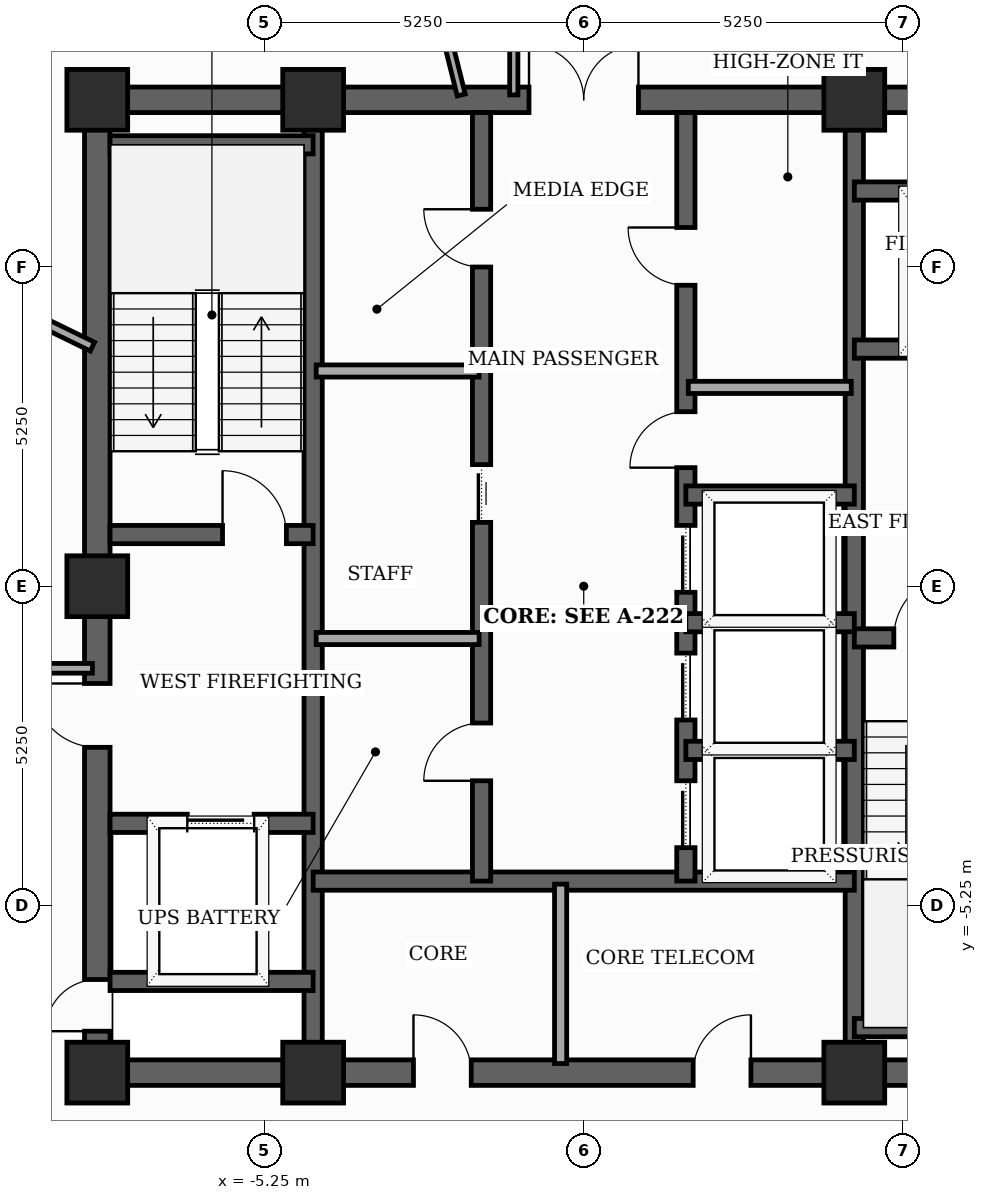
"""IFC4 building model, lengths in metres.
Left out: names, types, materials, properties, quantities, classifications, styles, units other than length and angle.
Written with IfcOpenShell. Run it as: python <this file> out.ifc"""

import sys

from ifc_helpers import new_model, si_unit, direction, frame, frame_2d, origin, origin_2d, place, context, subcontext, project, spatial, rectangle, extrude, element, fill, save


model = new_model("IFC4")
c1 = context("Model", 3, precision=1e-05, world=origin(), true_north=direction((0.0, 1.0)))
c2 = subcontext(c1, "Body", "Model", "MODEL_VIEW")
j1 = project(units=[si_unit("LENGTHUNIT", "METRE"), si_unit("PLANEANGLEUNIT", "RADIAN")], contexts=[c1])
p1 = place(None, origin())
s1 = spatial("IfcSite", under=j1, at=p1, CompositionType="ELEMENT")
p2 = place(p1, origin())
s2 = spatial("IfcBuilding", under=s1, at=p2, CompositionType="ELEMENT")
p3 = place(p2, frame((0.0, 0.0, 255.9)))
s3 = spatial("IfcBuildingStorey", under=s2, at=p3, CompositionType="ELEMENT", Elevation=255.9)
for number, where, z_axis, x_axis in (
    (1, (-8.0, -8.0, 0.0), (0.0, 0.0, 1.0), (1.0, 0.0, 0.0)),
    (2, (-4.45, -8.0, 0.0), (0.0, 0.0, 1.0), (1.0, 0.0, 0.0)),
    (3, (4.45, -8.0, 0.0), (0.0, 0.0, 1.0), (1.0, 0.0, 0.0)),
    (4, (4.45, 8.0, 0.0), (0.0, 0.0, 1.0), (1.0, 0.0, 0.0)),
    (5, (-4.45, 8.0, 0.0), (0.0, 0.0, 1.0), (1.0, 0.0, 0.0)),
    (6, (-8.0, 8.0, 0.0), (0.0, 0.0, 1.0), (1.0, 0.0, 0.0)),
    (7, (-8.0, 0.0, 0.0), (0.0, 0.0, 1.0), (1.0, 0.0, 0.0)),
):
    element("IfcColumn", number, at=place(p3, frame(where, z_axis=z_axis, x_axis=x_axis)), inside=s3, PredefinedType="COLUMN", context=c2, shape_type="SweptSolid", body=[
        extrude(rectangle(XDim=1.0, YDim=1.0, at=origin_2d()), origin(), (0.0, 0.0, 1.0), 3.7),
    ])
p4 = place(p3, frame((-8.0, -8.0, 0.0), z_axis=(0.0, 0.0, 1.0), x_axis=(0.0, 1.0, 0.0)))
e8 = element("IfcWall", 8, at=p4, inside=s3, PredefinedType="SHEAR", context=c2, shape_type="SweptSolid", body=[
    extrude(rectangle(XDim=16.0, YDim=0.42, at=frame_2d((8.0, 0.0))), origin(), (0.0, 0.0, 1.0), 3.5),
])
p5 = place(p4, frame((0.681, 0.0, 0.0)))
e9 = element("IfcOpeningElement", 9, at=p5, cuts=e8, PredefinedType="OPENING", context=c2, shape_type="SweptSolid", body=[
    extrude(rectangle(XDim=0.85, YDim=2.02, at=frame_2d((0.425, 1.01))), frame((0.0, 0.22, 0.0), z_axis=(0.0, -1.0, 0.0), x_axis=(1.0, 0.0, 0.0)), (0.0, 0.0, 1.0), 0.44),
])
p6 = place(p4, frame((5.35, 0.0, 0.0)))
e10 = element("IfcOpeningElement", 10, at=p6, cuts=e8, PredefinedType="OPENING", context=c2, shape_type="SweptSolid", body=[
    extrude(rectangle(XDim=1.05, YDim=2.15, at=frame_2d((0.525, 1.075))), frame((0.0, 0.22, 0.0), z_axis=(0.0, -1.0, 0.0), x_axis=(1.0, 0.0, 0.0)), (0.0, 0.0, 1.0), 0.44),
])
p7 = place(p3, frame((-8.0, -8.0, 0.0), z_axis=(0.0, 0.0, 1.0), x_axis=(1.0, 0.0, 0.0)))
e11 = element("IfcWall", 11, at=p7, inside=s3, PredefinedType="SHEAR", context=c2, shape_type="SweptSolid", body=[
    extrude(rectangle(XDim=16.0, YDim=0.42, at=frame_2d((8.0, 0.0))), origin(), (0.0, 0.0, 1.0), 3.5),
])
p8 = place(p7, frame((5.2, 0.0, 0.0)))
e12 = element("IfcOpeningElement", 12, at=p8, cuts=e11, PredefinedType="OPENING", context=c2, shape_type="SweptSolid", body=[
    extrude(rectangle(XDim=0.95, YDim=2.1, at=frame_2d((0.475, 1.05))), frame((0.0, 0.22, 0.0), z_axis=(0.0, -1.0, 0.0), x_axis=(1.0, 0.0, 0.0)), (0.0, 0.0, 1.0), 0.44),
])
p9 = place(p7, frame((9.8, 0.0, 0.0)))
e13 = element("IfcOpeningElement", 13, at=p9, cuts=e11, PredefinedType="OPENING", context=c2, shape_type="SweptSolid", body=[
    extrude(rectangle(XDim=0.95, YDim=2.1, at=frame_2d((0.475, 1.05))), frame((0.0, 0.22, 0.0), z_axis=(0.0, -1.0, 0.0), x_axis=(1.0, 0.0, 0.0)), (0.0, 0.0, 1.0), 0.44),
])
p10 = place(p3, frame((-8.0, 8.0, 0.0), z_axis=(0.0, 0.0, 1.0), x_axis=(1.0, 0.0, 0.0)))
e14 = element("IfcWall", 14, at=p10, inside=s3, PredefinedType="SHEAR", context=c2, shape_type="SweptSolid", body=[
    extrude(rectangle(XDim=16.0, YDim=0.42, at=frame_2d((8.0, 0.0))), origin(), (0.0, 0.0, 1.0), 3.5),
])
p11 = place(p10, frame((7.1, 0.0, 0.0)))
e15 = element("IfcOpeningElement", 15, at=p11, cuts=e14, PredefinedType="OPENING", context=c2, shape_type="SweptSolid", body=[
    extrude(rectangle(XDim=1.8, YDim=2.15, at=frame_2d((0.9, 1.075))), frame((0.0, 0.22, 0.0), z_axis=(0.0, -1.0, 0.0), x_axis=(1.0, 0.0, 0.0)), (0.0, 0.0, 1.0), 0.44),
])
for number, where, z_axis, x_axis in (
    (16, (-4.45, -7.79, 0.0), (0.0, 0.0, 1.0), (0.0, 1.0, 0.0)),
    (17, (4.45, -7.79, 0.0), (0.0, 0.0, 1.0), (0.0, 1.0, 0.0)),
):
    element("IfcWall", number, at=place(p3, frame(where, z_axis=z_axis, x_axis=x_axis)), inside=s3, PredefinedType="SHEAR", context=c2, shape_type="SweptSolid", body=[
        extrude(rectangle(XDim=15.58, YDim=0.3, at=frame_2d((7.79, 0.0))), origin(), (0.0, 0.0, 1.0), 3.5),
    ])
p12 = place(p3, frame((-7.79, 0.85, 0.0), z_axis=(0.0, 0.0, 1.0), x_axis=(1.0, 0.0, 0.0)))
e18 = element("IfcWall", 18, at=p12, inside=s3, PredefinedType="SHEAR", context=c2, shape_type="SweptSolid", body=[
    extrude(rectangle(XDim=3.34, YDim=0.3, at=frame_2d((1.67, 0.0))), origin(), (0.0, 0.0, 1.0), 3.5),
])
p13 = place(p12, frame((1.85, 0.0, 0.0)))
e19 = element("IfcOpeningElement", 19, at=p13, cuts=e18, PredefinedType="OPENING", context=c2, shape_type="SweptSolid", body=[
    extrude(rectangle(XDim=1.05, YDim=2.15, at=frame_2d((0.525, 1.075))), frame((0.0, 0.16, 0.0), z_axis=(0.0, -1.0, 0.0), x_axis=(1.0, 0.0, 0.0)), (0.0, 0.0, 1.0), 0.32),
])
p14 = place(p3, frame((-7.79, 7.26, 0.0), z_axis=(0.0, 0.0, 1.0), x_axis=(1.0, 0.0, 0.0)))
e20 = element("IfcWall", 20, at=p14, inside=s3, PredefinedType="SHEAR", context=c2, shape_type="SweptSolid", body=[
    extrude(rectangle(XDim=3.34, YDim=0.3, at=frame_2d((1.67, 0.0))), origin(), (0.0, 0.0, 1.0), 3.5),
])
p15 = place(p3, frame((4.45, -0.85, 0.0), z_axis=(0.0, 0.0, 1.0), x_axis=(1.0, 0.0, 0.0)))
e21 = element("IfcWall", 21, at=p15, inside=s3, PredefinedType="SHEAR", context=c2, shape_type="SweptSolid", body=[
    extrude(rectangle(XDim=3.34, YDim=0.3, at=frame_2d((1.67, 0.0))), origin(), (0.0, 0.0, 1.0), 3.5),
])
p16 = place(p15, frame((0.65, 0.0, 0.0)))
e22 = element("IfcOpeningElement", 22, at=p16, cuts=e21, PredefinedType="OPENING", context=c2, shape_type="SweptSolid", body=[
    extrude(rectangle(XDim=1.05, YDim=2.15, at=frame_2d((0.525, 1.075))), frame((0.0, 0.16, 0.0), z_axis=(0.0, -1.0, 0.0), x_axis=(1.0, 0.0, 0.0)), (0.0, 0.0, 1.0), 0.32),
])
p17 = place(p3, frame((4.45, -7.26, 0.0), z_axis=(0.0, 0.0, 1.0), x_axis=(1.0, 0.0, 0.0)))
e23 = element("IfcWall", 23, at=p17, inside=s3, PredefinedType="SHEAR", context=c2, shape_type="SweptSolid", body=[
    extrude(rectangle(XDim=3.55, YDim=0.3, at=frame_2d((1.775, 0.0))), origin(), (0.0, 0.0, 1.0), 3.5),
])
p18 = place(p3, frame((-7.79, -3.9, 0.0), z_axis=(0.0, 0.0, 1.0), x_axis=(1.0, 0.0, 0.0)))
e24 = element("IfcWall", 24, at=p18, inside=s3, PredefinedType="SHEAR", context=c2, shape_type="SweptSolid", body=[
    extrude(rectangle(XDim=3.34, YDim=0.3, at=frame_2d((1.67, 0.0))), origin(), (0.0, 0.0, 1.0), 3.5),
])
p19 = place(p18, frame((1.27, 0.0, 0.0)))
e25 = element("IfcOpeningElement", 25, at=p19, cuts=e24, PredefinedType="OPENING", context=c2, shape_type="SweptSolid", body=[
    extrude(rectangle(XDim=1.1, YDim=2.1, at=frame_2d((0.55, 1.05))), frame((0.0, 0.16, 0.0), z_axis=(0.0, -1.0, 0.0), x_axis=(1.0, 0.0, 0.0)), (0.0, 0.0, 1.0), 0.32),
])
p20 = place(p3, frame((-7.79, -6.5, 0.0), z_axis=(0.0, 0.0, 1.0), x_axis=(1.0, 0.0, 0.0)))
e26 = element("IfcWall", 26, at=p20, inside=s3, PredefinedType="SHEAR", context=c2, shape_type="SweptSolid", body=[
    extrude(rectangle(XDim=3.34, YDim=0.3, at=frame_2d((1.67, 0.0))), origin(), (0.0, 0.0, 1.0), 3.5),
])
p21 = place(p3, frame((4.45, 3.9, 0.0), z_axis=(0.0, 0.0, 1.0), x_axis=(1.0, 0.0, 0.0)))
e27 = element("IfcWall", 27, at=p21, inside=s3, PredefinedType="SHEAR", context=c2, shape_type="SweptSolid", body=[
    extrude(rectangle(XDim=3.34, YDim=0.3, at=frame_2d((1.67, 0.0))), origin(), (0.0, 0.0, 1.0), 3.5),
])
p22 = place(p21, frame((1.18, 0.0, 0.0)))
e28 = element("IfcOpeningElement", 28, at=p22, cuts=e27, PredefinedType="OPENING", context=c2, shape_type="SweptSolid", body=[
    extrude(rectangle(XDim=1.1, YDim=2.1, at=frame_2d((0.55, 1.05))), frame((0.0, 0.16, 0.0), z_axis=(0.0, -1.0, 0.0), x_axis=(1.0, 0.0, 0.0)), (0.0, 0.0, 1.0), 0.32),
])
p23 = place(p3, frame((4.45, 6.5, 0.0), z_axis=(0.0, 0.0, 1.0), x_axis=(1.0, 0.0, 0.0)))
e29 = element("IfcWall", 29, at=p23, inside=s3, PredefinedType="SHEAR", context=c2, shape_type="SweptSolid", body=[
    extrude(rectangle(XDim=3.34, YDim=0.3, at=frame_2d((1.67, 0.0))), origin(), (0.0, 0.0, 1.0), 3.5),
])
p24 = place(p3, frame((-4.45, -4.85, 0.0), z_axis=(0.0, 0.0, 1.0), x_axis=(1.0, 0.0, 0.0)))
e30 = element("IfcWall", 30, at=p24, inside=s3, PredefinedType="SHEAR", context=c2, shape_type="SweptSolid", body=[
    extrude(rectangle(XDim=8.9, YDim=0.3, at=frame_2d((4.45, 0.0))), origin(), (0.0, 0.0, 1.0), 3.5),
])
p25 = place(p3, frame((-1.68, -4.85, 0.0), z_axis=(0.0, 0.0, 1.0), x_axis=(0.0, 1.0, 0.0)))
e31 = element("IfcWall", 31, at=p25, inside=s3, PredefinedType="SHEAR", context=c2, shape_type="SweptSolid", body=[
    extrude(rectangle(XDim=12.64, YDim=0.3, at=frame_2d((6.32, 0.0))), origin(), (0.0, 0.0, 1.0), 3.5),
])
p26 = place(p25, frame((1.65, 0.0, 0.0)))
e32 = element("IfcOpeningElement", 32, at=p26, cuts=e31, PredefinedType="OPENING", context=c2, shape_type="SweptSolid", body=[
    extrude(rectangle(XDim=0.95, YDim=2.1, at=frame_2d((0.475, 1.05))), frame((0.0, 0.16, 0.0), z_axis=(0.0, -1.0, 0.0), x_axis=(1.0, 0.0, 0.0)), (0.0, 0.0, 1.0), 0.32),
])
p27 = place(p25, frame((5.9, 0.0, 0.0)))
e33 = element("IfcOpeningElement", 33, at=p27, cuts=e31, PredefinedType="OPENING", context=c2, shape_type="SweptSolid", body=[
    extrude(rectangle(XDim=0.95, YDim=2.1, at=frame_2d((0.475, 1.05))), frame((0.0, 0.16, 0.0), z_axis=(0.0, -1.0, 0.0), x_axis=(1.0, 0.0, 0.0)), (0.0, 0.0, 1.0), 0.32),
])
p28 = place(p25, frame((10.1, 0.0, 0.0)))
e34 = element("IfcOpeningElement", 34, at=p28, cuts=e31, PredefinedType="OPENING", context=c2, shape_type="SweptSolid", body=[
    extrude(rectangle(XDim=0.95, YDim=2.1, at=frame_2d((0.475, 1.05))), frame((0.0, 0.16, 0.0), z_axis=(0.0, -1.0, 0.0), x_axis=(1.0, 0.0, 0.0)), (0.0, 0.0, 1.0), 0.32),
])
p29 = place(p3, frame((1.68, -4.85, 0.0), z_axis=(0.0, 0.0, 1.0), x_axis=(0.0, 1.0, 0.0)))
e35 = element("IfcWall", 35, at=p29, inside=s3, PredefinedType="SHEAR", context=c2, shape_type="SweptSolid", body=[
    extrude(rectangle(XDim=12.64, YDim=0.3, at=frame_2d((6.32, 0.0))), origin(), (0.0, 0.0, 1.0), 3.5),
])
p30 = place(p29, frame((0.55, 0.0, 0.0)))
e36 = element("IfcOpeningElement", 36, at=p30, cuts=e35, PredefinedType="OPENING", context=c2, shape_type="SweptSolid", body=[
    extrude(rectangle(XDim=1.1, YDim=2.1, at=frame_2d((0.55, 1.05))), frame((0.0, 0.16, 0.0), z_axis=(0.0, -1.0, 0.0), x_axis=(1.0, 0.0, 0.0)), (0.0, 0.0, 1.0), 0.32),
])
p31 = place(p29, frame((2.65, 0.0, 0.0)))
e37 = element("IfcOpeningElement", 37, at=p31, cuts=e35, PredefinedType="OPENING", context=c2, shape_type="SweptSolid", body=[
    extrude(rectangle(XDim=1.1, YDim=2.1, at=frame_2d((0.55, 1.05))), frame((0.0, 0.16, 0.0), z_axis=(0.0, -1.0, 0.0), x_axis=(1.0, 0.0, 0.0)), (0.0, 0.0, 1.0), 0.32),
])
p32 = place(p29, frame((4.75, 0.0, 0.0)))
e38 = element("IfcOpeningElement", 38, at=p32, cuts=e35, PredefinedType="OPENING", context=c2, shape_type="SweptSolid", body=[
    extrude(rectangle(XDim=1.1, YDim=2.1, at=frame_2d((0.55, 1.05))), frame((0.0, 0.16, 0.0), z_axis=(0.0, -1.0, 0.0), x_axis=(1.0, 0.0, 0.0)), (0.0, 0.0, 1.0), 0.32),
])
p33 = place(p29, frame((6.8, 0.0, 0.0)))
e39 = element("IfcOpeningElement", 39, at=p33, cuts=e35, PredefinedType="OPENING", context=c2, shape_type="SweptSolid", body=[
    extrude(rectangle(XDim=0.92, YDim=2.1, at=frame_2d((0.46, 1.05))), frame((0.0, 0.16, 0.0), z_axis=(0.0, -1.0, 0.0), x_axis=(1.0, 0.0, 0.0)), (0.0, 0.0, 1.0), 0.32),
])
p34 = place(p29, frame((9.8, 0.0, 0.0)))
e40 = element("IfcOpeningElement", 40, at=p34, cuts=e35, PredefinedType="OPENING", context=c2, shape_type="SweptSolid", body=[
    extrude(rectangle(XDim=0.95, YDim=2.1, at=frame_2d((0.475, 1.05))), frame((0.0, 0.16, 0.0), z_axis=(0.0, -1.0, 0.0), x_axis=(1.0, 0.0, 0.0)), (0.0, 0.0, 1.0), 0.32),
])
for number, where, z_axis, x_axis in (
    (41, (1.68, 1.5, 0.0), (0.0, 0.0, 1.0), (1.0, 0.0, 0.0)),
    (42, (1.68, -2.7, 0.0), (0.0, 0.0, 1.0), (1.0, 0.0, 0.0)),
    (43, (1.68, -0.6, 0.0), (0.0, 0.0, 1.0), (1.0, 0.0, 0.0)),
):
    element("IfcWall", number, at=place(p3, frame(where, z_axis=z_axis, x_axis=x_axis)), inside=s3, PredefinedType="SHEAR", context=c2, shape_type="SweptSolid", body=[
        extrude(rectangle(XDim=2.77, YDim=0.3, at=frame_2d((1.385, 0.0))), origin(), (0.0, 0.0, 1.0), 3.5),
    ])
p35 = place(p3, frame((-0.38, -7.85, 0.0), z_axis=(0.0, 0.0, 1.0), x_axis=(0.0, 1.0, 0.0)))
e44 = element("IfcWall", 44, at=p35, inside=s3, PredefinedType="SOLIDWALL", context=c2, shape_type="SweptSolid", body=[
    extrude(rectangle(XDim=2.95, YDim=0.2, at=frame_2d((1.475, 0.0))), origin(), (0.0, 0.0, 1.0), 2.885),
])
for number, where, z_axis, x_axis in (
    (45, (-4.4, -0.86, 0.0), (0.0, 0.0, 1.0), (1.0, 0.0, 0.0)),
    (46, (-4.4, 3.54, 0.0), (0.0, 0.0, 1.0), (1.0, 0.0, 0.0)),
    (47, (1.72, 3.27, 0.0), (0.0, 0.0, 1.0), (1.0, 0.0, 0.0)),
):
    element("IfcWall", number, at=place(p3, frame(where, z_axis=z_axis, x_axis=x_axis)), inside=s3, PredefinedType="SOLIDWALL", context=c2, shape_type="SweptSolid", body=[
        extrude(rectangle(XDim=2.68, YDim=0.2, at=frame_2d((1.34, 0.0))), origin(), (0.0, 0.0, 1.0), 3.5),
    ])
p36 = place(p3, frame((-8.08, -1.35, 0.0), z_axis=(0.0, 0.0, 1.0), x_axis=(-1.0, 0.0, 0.0)))
e48 = element("IfcWall", 48, at=p36, inside=s3, PredefinedType="PARTITIONING", context=c2, shape_type="SweptSolid", body=[
    extrude(rectangle(XDim=2.57, YDim=0.16, at=frame_2d((1.285, 0.0))), origin(), (0.0, 0.0, 1.0), 2.885),
])
p37 = place(p3, frame((-1.15, 10.65, 0.0), z_axis=(0.0, 0.0, 1.0), x_axis=(0.0, -1.0, 0.0)))
e49 = element("IfcWall", 49, at=p37, inside=s3, PredefinedType="PARTITIONING", context=c2, shape_type="SweptSolid", body=[
    extrude(rectangle(XDim=2.57, YDim=0.135, at=frame_2d((1.285, 0.0))), origin(), (0.0, 0.0, 1.0), 2.885),
])
p38 = place(p3, frame((-8.08, 3.941, 0.0), z_axis=(0.0, 0.0, 1.0), x_axis=(-0.898794985177, 0.438369221798, 0.0)))
e50 = element("IfcWall", 50, at=p38, inside=s3, PredefinedType="PARTITIONING", context=c2, shape_type="SweptSolid", body=[
    extrude(rectangle(XDim=6.719, YDim=0.16, at=frame_2d((3.359, 0.0))), origin(), (0.0, 0.0, 1.0), 2.885),
])
p39 = place(p3, frame((-3.8, 15.242, 0.0), z_axis=(0.0, 0.0, 1.0), x_axis=(0.241889603588, -0.970303777008, 0.0)))
e51 = element("IfcWall", 51, at=p39, inside=s3, PredefinedType="PARTITIONING", context=c2, shape_type="SweptSolid", body=[
    extrude(rectangle(XDim=7.381, YDim=0.135, at=frame_2d((3.69, 0.0))), origin(), (0.0, 0.0, 1.0), 2.885),
])
p40 = place(p39, frame((3.231, 0.0, 0.0)))
e52 = element("IfcOpeningElement", 52, at=p40, cuts=e51, PredefinedType="OPENING", context=c2, shape_type="SweptSolid", body=[
    extrude(rectangle(XDim=0.92, YDim=2.1, at=frame_2d((0.46, 1.05))), frame((0.0, 0.077, 0.0), z_axis=(0.0, -1.0, 0.0), x_axis=(1.0, 0.0, 0.0)), (0.0, 0.0, 1.0), 0.155),
])
p41 = place(p5, origin())
e53 = element("IfcDoor", 53, at=p41, inside=s3, OperationType="SINGLE_SWING_LEFT", PredefinedType="TRAPDOOR", context=c2, shape_type="SweptSolid", body=[
    extrude(rectangle(XDim=0.85, YDim=2.02, at=frame_2d((0.425, 1.01))), frame((0.0, 0.025, 0.0), z_axis=(0.0, -1.0, 0.0), x_axis=(1.0, 0.0, 0.0)), (0.0, 0.0, 1.0), 0.05),
])
fill(e9, e53)
p42 = place(p6, origin())
e54 = element("IfcDoor", 54, at=p42, inside=s3, OperationType="SINGLE_SWING_RIGHT", PredefinedType="DOOR", context=c2, shape_type="SweptSolid", body=[
    extrude(rectangle(XDim=1.05, YDim=2.15, at=frame_2d((0.525, 1.075))), frame((0.0, 0.025, 0.0), z_axis=(0.0, -1.0, 0.0), x_axis=(1.0, 0.0, 0.0)), (0.0, 0.0, 1.0), 0.05),
])
fill(e10, e54)
p43 = place(p8, origin())
e55 = element("IfcDoor", 55, at=p43, inside=s3, OperationType="SINGLE_SWING_LEFT", PredefinedType="DOOR", context=c2, shape_type="SweptSolid", body=[
    extrude(rectangle(XDim=0.95, YDim=2.1, at=frame_2d((0.475, 1.05))), frame((0.0, 0.025, 0.0), z_axis=(0.0, -1.0, 0.0), x_axis=(1.0, 0.0, 0.0)), (0.0, 0.0, 1.0), 0.05),
])
fill(e12, e55)
p44 = place(p9, origin())
e56 = element("IfcDoor", 56, at=p44, inside=s3, OperationType="SINGLE_SWING_RIGHT", PredefinedType="DOOR", context=c2, shape_type="SweptSolid", body=[
    extrude(rectangle(XDim=0.95, YDim=2.1, at=frame_2d((0.475, 1.05))), frame((0.0, 0.025, 0.0), z_axis=(0.0, -1.0, 0.0), x_axis=(1.0, 0.0, 0.0)), (0.0, 0.0, 1.0), 0.05),
])
fill(e13, e56)
p45 = place(p11, origin())
e57 = element("IfcDoor", 57, at=p45, inside=s3, OperationType="DOUBLE_DOOR_SINGLE_SWING", PredefinedType="DOOR", context=c2, shape_type="SweptSolid", body=[
    extrude(rectangle(XDim=1.8, YDim=2.15, at=frame_2d((0.9, 1.075))), frame((0.0, 0.025, 0.0), z_axis=(0.0, -1.0, 0.0), x_axis=(1.0, 0.0, 0.0)), (0.0, 0.0, 1.0), 0.05),
])
fill(e15, e57)
p46 = place(p13, origin())
e58 = element("IfcDoor", 58, at=p46, inside=s3, OperationType="SINGLE_SWING_LEFT", PredefinedType="DOOR", context=c2, shape_type="SweptSolid", body=[
    extrude(rectangle(XDim=1.05, YDim=2.15, at=frame_2d((0.525, 1.075))), frame((0.0, 0.025, 0.0), z_axis=(0.0, -1.0, 0.0), x_axis=(1.0, 0.0, 0.0)), (0.0, 0.0, 1.0), 0.05),
])
fill(e19, e58)
p47 = place(p16, origin())
e59 = element("IfcDoor", 59, at=p47, inside=s3, OperationType="SINGLE_SWING_RIGHT", PredefinedType="DOOR", context=c2, shape_type="SweptSolid", body=[
    extrude(rectangle(XDim=1.05, YDim=2.15, at=frame_2d((0.525, 1.075))), frame((0.0, 0.025, 0.0), z_axis=(0.0, -1.0, 0.0), x_axis=(1.0, 0.0, 0.0)), (0.0, 0.0, 1.0), 0.05),
])
fill(e22, e59)
p48 = place(p19, origin())
e60 = element("IfcDoor", 60, at=p48, inside=s3, OperationType="SLIDING_TO_LEFT", PredefinedType="DOOR", context=c2, shape_type="SweptSolid", body=[
    extrude(rectangle(XDim=1.1, YDim=2.1, at=frame_2d((0.55, 1.05))), frame((0.0, 0.025, 0.0), z_axis=(0.0, -1.0, 0.0), x_axis=(1.0, 0.0, 0.0)), (0.0, 0.0, 1.0), 0.05),
])
fill(e25, e60)
p49 = place(p26, origin())
e61 = element("IfcDoor", 61, at=p49, inside=s3, OperationType="SINGLE_SWING_LEFT", PredefinedType="DOOR", context=c2, shape_type="SweptSolid", body=[
    extrude(rectangle(XDim=0.95, YDim=2.1, at=frame_2d((0.475, 1.05))), frame((0.0, 0.025, 0.0), z_axis=(0.0, -1.0, 0.0), x_axis=(1.0, 0.0, 0.0)), (0.0, 0.0, 1.0), 0.05),
])
fill(e32, e61)
p50 = place(p27, origin())
e62 = element("IfcDoor", 62, at=p50, inside=s3, OperationType="SLIDING_TO_LEFT", PredefinedType="DOOR", context=c2, shape_type="SweptSolid", body=[
    extrude(rectangle(XDim=0.95, YDim=2.1, at=frame_2d((0.475, 1.05))), frame((0.0, 0.025, 0.0), z_axis=(0.0, -1.0, 0.0), x_axis=(1.0, 0.0, 0.0)), (0.0, 0.0, 1.0), 0.05),
])
fill(e33, e62)
p51 = place(p28, origin())
e63 = element("IfcDoor", 63, at=p51, inside=s3, OperationType="SINGLE_SWING_RIGHT", PredefinedType="DOOR", context=c2, shape_type="SweptSolid", body=[
    extrude(rectangle(XDim=0.95, YDim=2.1, at=frame_2d((0.475, 1.05))), frame((0.0, 0.025, 0.0), z_axis=(0.0, -1.0, 0.0), x_axis=(1.0, 0.0, 0.0)), (0.0, 0.0, 1.0), 0.05),
])
fill(e34, e63)
p52 = place(p30, origin())
e64 = element("IfcDoor", 64, at=p52, inside=s3, OperationType="SLIDING_TO_LEFT", PredefinedType="DOOR", context=c2, shape_type="SweptSolid", body=[
    extrude(rectangle(XDim=1.1, YDim=2.1, at=frame_2d((0.55, 1.05))), frame((0.0, 0.025, 0.0), z_axis=(0.0, -1.0, 0.0), x_axis=(1.0, 0.0, 0.0)), (0.0, 0.0, 1.0), 0.05),
])
fill(e36, e64)
p53 = place(p31, origin())
e65 = element("IfcDoor", 65, at=p53, inside=s3, OperationType="SLIDING_TO_LEFT", PredefinedType="DOOR", context=c2, shape_type="SweptSolid", body=[
    extrude(rectangle(XDim=1.1, YDim=2.1, at=frame_2d((0.55, 1.05))), frame((0.0, 0.025, 0.0), z_axis=(0.0, -1.0, 0.0), x_axis=(1.0, 0.0, 0.0)), (0.0, 0.0, 1.0), 0.05),
])
fill(e37, e65)
p54 = place(p32, origin())
e66 = element("IfcDoor", 66, at=p54, inside=s3, OperationType="SLIDING_TO_LEFT", PredefinedType="DOOR", context=c2, shape_type="SweptSolid", body=[
    extrude(rectangle(XDim=1.1, YDim=2.1, at=frame_2d((0.55, 1.05))), frame((0.0, 0.025, 0.0), z_axis=(0.0, -1.0, 0.0), x_axis=(1.0, 0.0, 0.0)), (0.0, 0.0, 1.0), 0.05),
])
fill(e38, e66)
p55 = place(p33, origin())
e67 = element("IfcDoor", 67, at=p55, inside=s3, OperationType="SINGLE_SWING_LEFT", PredefinedType="DOOR", context=c2, shape_type="SweptSolid", body=[
    extrude(rectangle(XDim=0.92, YDim=2.1, at=frame_2d((0.46, 1.05))), frame((0.0, 0.025, 0.0), z_axis=(0.0, -1.0, 0.0), x_axis=(1.0, 0.0, 0.0)), (0.0, 0.0, 1.0), 0.05),
])
fill(e39, e67)
p56 = place(p34, origin())
e68 = element("IfcDoor", 68, at=p56, inside=s3, OperationType="SINGLE_SWING_RIGHT", PredefinedType="DOOR", context=c2, shape_type="SweptSolid", body=[
    extrude(rectangle(XDim=0.95, YDim=2.1, at=frame_2d((0.475, 1.05))), frame((0.0, 0.025, 0.0), z_axis=(0.0, -1.0, 0.0), x_axis=(1.0, 0.0, 0.0)), (0.0, 0.0, 1.0), 0.05),
])
fill(e40, e68)
save(model, sys.argv[1])
